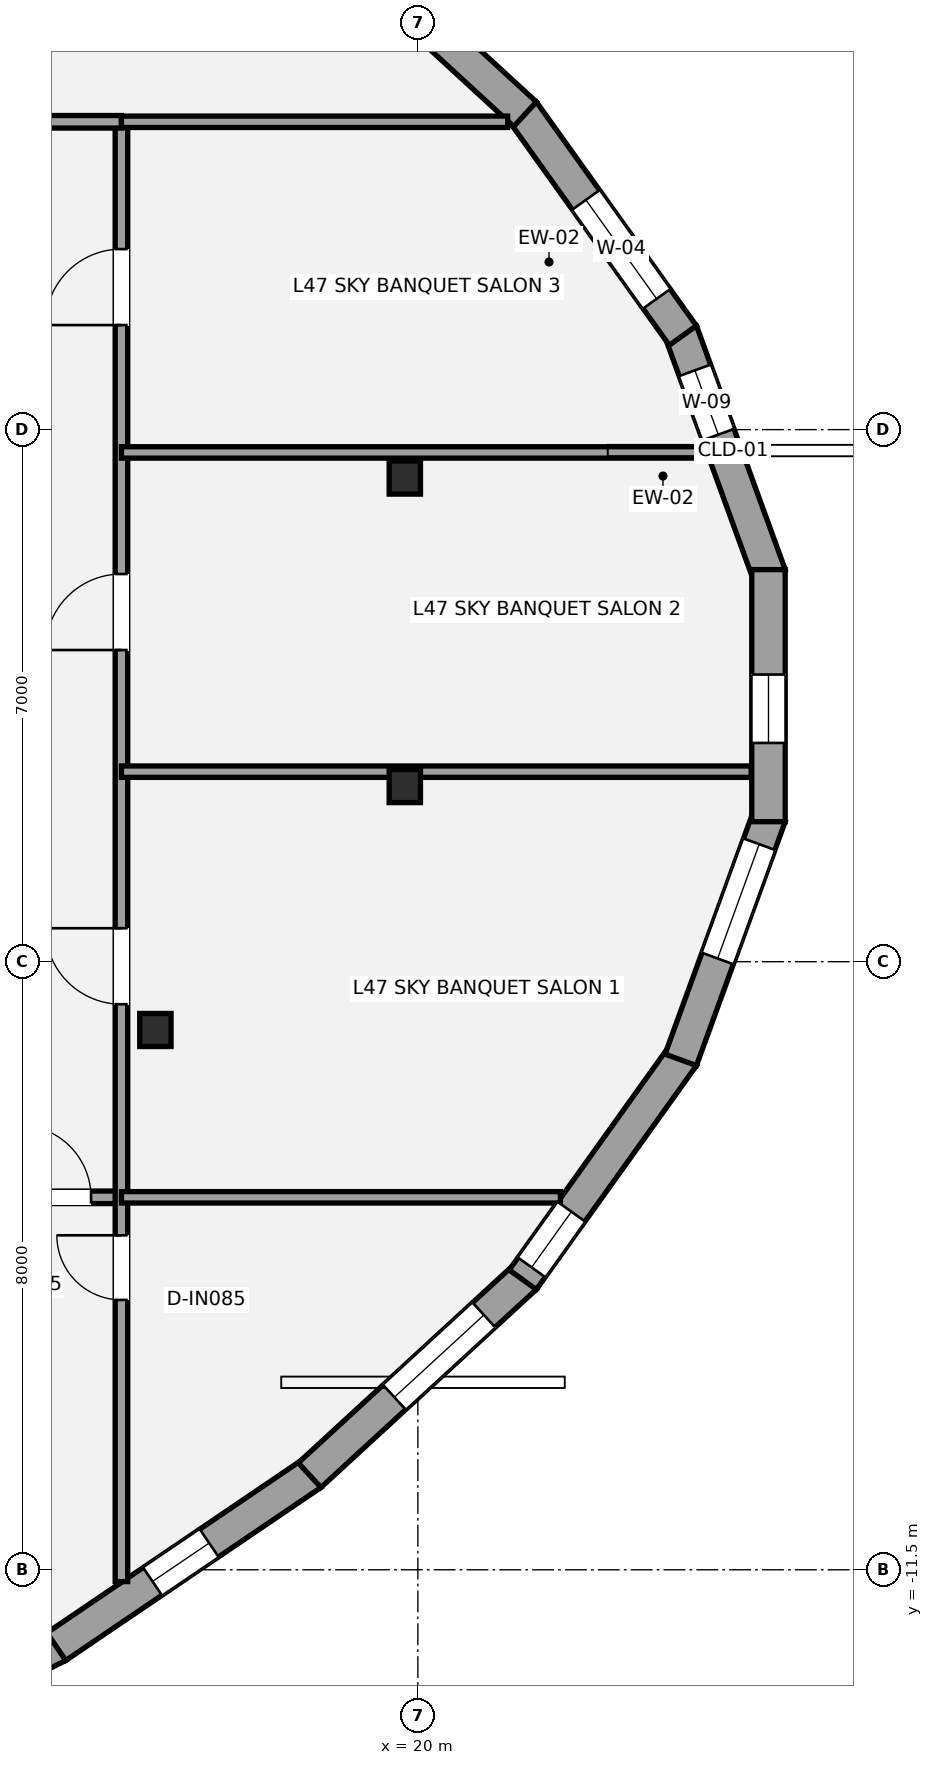
"""IFC4 building model, lengths in metres.
Left out: names, types, materials, properties, quantities, classifications, styles, units other than length and angle.
Written with IfcOpenShell. Run it as: python <this file> out.ifc"""

import sys

from ifc_helpers import new_model, si_unit, direction, frame, frame_2d, origin, origin_2d, place, context, subcontext, project, spatial, rectangle, i_section, extrude, element, fill, save


model = new_model("IFC4")
c1 = context("Model", 3, precision=1e-05, world=origin(), true_north=direction((0.0, 1.0)))
c2 = subcontext(c1, "Body", "Model", "MODEL_VIEW")
j1 = project(units=[si_unit("LENGTHUNIT", "METRE"), si_unit("PLANEANGLEUNIT", "RADIAN")], contexts=[c1])
p1 = place(None, origin())
s1 = spatial("IfcSite", under=j1, at=p1, CompositionType="ELEMENT")
p2 = place(p1, origin())
s2 = spatial("IfcBuilding", under=s1, at=p2, CompositionType="ELEMENT")
p3 = place(p2, frame((0.0, 0.0, 172.6)))
s3 = spatial("IfcBuildingStorey", under=s2, at=p3, CompositionType="ELEMENT", Elevation=172.6)
for number, where, z_axis, x_axis in (
    (1, (19.828, 2.869, 0.0), (0.0, 0.0, 1.0), (1.0, 0.0, 0.0)),
    (2, (16.547, -4.398, 0.0), (0.0, 0.0, 1.0), (1.0, 0.0, 0.0)),
    (3, (19.828, -1.189, 0.0), (0.0, 0.0, 1.0), (1.0, 0.0, 0.0)),
):
    element("IfcColumn", number, at=place(p3, frame(where, z_axis=z_axis, x_axis=x_axis)), inside=s3, PredefinedType="COLUMN", context=c2, shape_type="SweptSolid", body=[
        extrude(i_section(OverallWidth=0.412, OverallDepth=0.435, WebThickness=0.036, FlangeThickness=0.057, at=origin_2d()), origin(), (0.0, 0.0, 1.0), 3.2),
    ])
p4 = place(p3, frame((23.459, 4.791, 0.0), z_axis=(0.0, 0.0, 1.0), x_axis=(0.341938259916, -0.93972241987, 0.0)))
e4 = element("IfcWall", 4, at=p4, inside=s3, PredefinedType="STANDARD", context=c2, shape_type="SweptSolid", body=[
    extrude(rectangle(XDim=3.414, YDim=0.44, at=frame_2d((1.707, 0.0))), origin(), (0.0, 0.0, 1.0), 2.315),
])
p5 = place(p4, frame((0.544, 0.0, 0.58)))
e5 = element("IfcOpeningElement", 5, at=p5, cuts=e4, PredefinedType="OPENING", context=c2, shape_type="SweptSolid", body=[
    extrude(rectangle(XDim=0.9, YDim=1.35, at=frame_2d((0.45, 0.675))), frame((0.0, 0.23, 0.0), z_axis=(0.0, -1.0, 0.0), x_axis=(1.0, 0.0, 0.0)), (0.0, 0.0, 1.0), 0.46),
])
p6 = place(p3, frame((21.38, 7.684, 0.0), z_axis=(0.0, 0.0, 1.0), x_axis=(0.581678195571, -0.813419004448, 0.0)))
e6 = element("IfcWall", 6, at=p6, inside=s3, PredefinedType="STANDARD", context=c2, shape_type="SweptSolid", body=[
    extrude(rectangle(XDim=3.621, YDim=0.44, at=frame_2d((1.811, 0.0))), origin(), (0.0, 0.0, 1.0), 2.315),
])
p7 = place(p6, frame((1.428, 0.0, 0.58)))
e7 = element("IfcOpeningElement", 7, at=p7, cuts=e6, PredefinedType="OPENING", context=c2, shape_type="SweptSolid", body=[
    extrude(rectangle(XDim=1.6, YDim=1.55, at=frame_2d((0.8, 0.775))), frame((0.0, 0.23, 0.0), z_axis=(0.0, -1.0, 0.0), x_axis=(1.0, 0.0, 0.0)), (0.0, 0.0, 1.0), 0.46),
])
p8 = place(p3, frame((18.576, 10.255, 0.0), z_axis=(0.0, 0.0, 1.0), x_axis=(0.736282263947, -0.676674536093, 0.0)))
e8 = element("IfcWall", 8, at=p8, inside=s3, PredefinedType="STANDARD", context=c2, shape_type="SweptSolid", body=[
    extrude(rectangle(XDim=3.85, YDim=0.44, at=frame_2d((1.925, 0.0))), origin(), (0.0, 0.0, 1.0), 2.315),
])
p9 = place(p8, frame((0.687, 0.0, 0.58)))
e9 = element("IfcOpeningElement", 9, at=p9, cuts=e8, PredefinedType="OPENING", context=c2, shape_type="SweptSolid", body=[
    extrude(rectangle(XDim=1.6, YDim=1.55, at=frame_2d((0.8, 0.775))), frame((0.0, 0.23, 0.0), z_axis=(0.0, -1.0, 0.0), x_axis=(1.0, 0.0, 0.0)), (0.0, 0.0, 1.0), 0.46),
])
p10 = place(p3, frame((15.269, -12.497, 0.0), z_axis=(0.0, 0.0, 1.0), x_axis=(-0.894427191, -0.4472135955, 0.0)))
e10 = element("IfcWall", 10, at=p10, inside=s3, PredefinedType="STANDARD", context=c2, shape_type="SweptSolid", body=[
    extrude(rectangle(XDim=4.297, YDim=0.44, at=frame_2d((2.148, 0.0))), origin(), (0.0, 0.0, 1.0), 2.315),
])
p11 = place(p10, frame((1.049, 0.0, 0.58)))
e11 = element("IfcOpeningElement", 11, at=p11, cuts=e10, PredefinedType="OPENING", context=c2, shape_type="SweptSolid", body=[
    extrude(rectangle(XDim=1.6, YDim=1.55, at=frame_2d((0.8, 0.775))), frame((0.0, 0.23, 0.0), z_axis=(0.0, -1.0, 0.0), x_axis=(1.0, 0.0, 0.0)), (0.0, 0.0, 1.0), 0.46),
])
p12 = place(p3, frame((18.601, -10.235, 0.0), z_axis=(0.0, 0.0, 1.0), x_axis=(-0.827757295322, -0.561086321382, 0.0)))
e12 = element("IfcWall", 12, at=p12, inside=s3, PredefinedType="STANDARD", context=c2, shape_type="SweptSolid", body=[
    extrude(rectangle(XDim=4.057, YDim=0.44, at=frame_2d((2.028, 0.0))), origin(), (0.0, 0.0, 1.0), 2.315),
])
p13 = place(p12, frame((1.627, 0.0, 0.58)))
e13 = element("IfcOpeningElement", 13, at=p13, cuts=e12, PredefinedType="OPENING", context=c2, shape_type="SweptSolid", body=[
    extrude(rectangle(XDim=0.9, YDim=1.35, at=frame_2d((0.45, 0.675))), frame((0.0, 0.23, 0.0), z_axis=(0.0, -1.0, 0.0), x_axis=(1.0, 0.0, 0.0)), (0.0, 0.0, 1.0), 0.46),
])
p14 = place(p3, frame((21.41, -7.65, 0.0), z_axis=(0.0, 0.0, 1.0), x_axis=(-0.736282263947, -0.676674536093, 0.0)))
e14 = element("IfcWall", 14, at=p14, inside=s3, PredefinedType="STANDARD", context=c2, shape_type="SweptSolid", body=[
    extrude(rectangle(XDim=3.85, YDim=0.44, at=frame_2d((1.925, 0.0))), origin(), (0.0, 0.0, 1.0), 2.315),
])
p15 = place(p14, frame((0.736, 0.0, 0.58)))
e15 = element("IfcOpeningElement", 15, at=p15, cuts=e14, PredefinedType="OPENING", context=c2, shape_type="SweptSolid", body=[
    extrude(rectangle(XDim=1.6, YDim=1.55, at=frame_2d((0.8, 0.775))), frame((0.0, 0.23, 0.0), z_axis=(0.0, -1.0, 0.0), x_axis=(1.0, 0.0, 0.0)), (0.0, 0.0, 1.0), 0.46),
])
p16 = place(p3, frame((23.487, -4.739, 0.0), z_axis=(0.0, 0.0, 1.0), x_axis=(-0.581678195571, -0.813419004448, 0.0)))
e16 = element("IfcWall", 16, at=p16, inside=s3, PredefinedType="STANDARD", context=c2, shape_type="SweptSolid", body=[
    extrude(rectangle(XDim=3.621, YDim=0.44, at=frame_2d((1.811, 0.0))), origin(), (0.0, 0.0, 1.0), 2.315),
])
p17 = place(p16, frame((2.521, 0.0, 0.58)))
e17 = element("IfcOpeningElement", 17, at=p17, cuts=e16, PredefinedType="OPENING", context=c2, shape_type="SweptSolid", body=[
    extrude(rectangle(XDim=0.9, YDim=1.35, at=frame_2d((0.45, 0.675))), frame((0.0, 0.23, 0.0), z_axis=(0.0, -1.0, 0.0), x_axis=(1.0, 0.0, 0.0)), (0.0, 0.0, 1.0), 0.46),
])
p18 = place(p3, frame((24.626, -1.583, 0.0), z_axis=(0.0, 0.0, 1.0), x_axis=(-0.341938259916, -0.93972241987, 0.0)))
e18 = element("IfcWall", 18, at=p18, inside=s3, PredefinedType="STANDARD", context=c2, shape_type="SweptSolid", body=[
    extrude(rectangle(XDim=3.414, YDim=0.44, at=frame_2d((1.707, 0.0))), origin(), (0.0, 0.0, 1.0), 2.315),
])
p19 = place(p18, frame((0.395, 0.0, 0.58)))
e19 = element("IfcOpeningElement", 19, at=p19, cuts=e18, PredefinedType="OPENING", context=c2, shape_type="SweptSolid", body=[
    extrude(rectangle(XDim=1.6, YDim=1.55, at=frame_2d((0.8, 0.775))), frame((0.0, 0.23, 0.0), z_axis=(0.0, -1.0, 0.0), x_axis=(1.0, 0.0, 0.0)), (0.0, 0.0, 1.0), 0.46),
])
p20 = place(p3, frame((24.613, 1.658, 0.0), z_axis=(0.0, 0.0, 1.0), x_axis=(0.0, -1.0, 0.0)))
e20 = element("IfcWall", 20, at=p20, inside=s3, PredefinedType="STANDARD", context=c2, shape_type="SweptSolid", body=[
    extrude(rectangle(XDim=3.316, YDim=0.44, at=frame_2d((1.658, 0.0))), origin(), (0.0, 0.0, 1.0), 2.315),
])
p21 = place(p20, frame((1.38, 0.0, 0.58)))
e21 = element("IfcOpeningElement", 21, at=p21, cuts=e20, PredefinedType="OPENING", context=c2, shape_type="SweptSolid", body=[
    extrude(rectangle(XDim=0.9, YDim=1.35, at=frame_2d((0.45, 0.675))), frame((0.0, 0.23, 0.0), z_axis=(0.0, -1.0, 0.0), x_axis=(1.0, 0.0, 0.0)), (0.0, 0.0, 1.0), 0.46),
])
p22 = place(p3, frame((-15.55, -6.6, 0.0), z_axis=(0.0, 0.0, 1.0), x_axis=(1.0, 0.0, 0.0)))
e22 = element("IfcWall", 22, at=p22, inside=s3, PredefinedType="PARTITIONING", context=c2, shape_type="SweptSolid", body=[
    extrude(rectangle(XDim=31.65, YDim=0.165, at=frame_2d((15.825, 0.0))), origin(), (0.0, 0.0, 1.0), 2.398),
])
p23 = place(p22, frame((14.7, 0.0, 0.0)))
e23 = element("IfcOpeningElement", 23, at=p23, cuts=e22, PredefinedType="OPENING", context=c2, shape_type="SweptSolid", body=[
    extrude(rectangle(XDim=0.95, YDim=2.15, at=frame_2d((0.475, 1.075))), frame((0.0, 0.093, 0.0), z_axis=(0.0, -1.0, 0.0), x_axis=(1.0, 0.0, 0.0)), (0.0, 0.0, 1.0), 0.185),
])
p24 = place(p22, frame((30.3, 0.0, 0.0)))
e24 = element("IfcOpeningElement", 24, at=p24, cuts=e22, PredefinedType="OPENING", context=c2, shape_type="SweptSolid", body=[
    extrude(rectangle(XDim=0.95, YDim=2.15, at=frame_2d((0.475, 1.075))), frame((0.0, 0.093, 0.0), z_axis=(0.0, -1.0, 0.0), x_axis=(1.0, 0.0, 0.0)), (0.0, 0.0, 1.0), 0.185),
])
p25 = place(p3, frame((16.1, -11.655, 0.0), z_axis=(0.0, 0.0, 1.0), x_axis=(0.0, 1.0, 0.0)))
e25 = element("IfcWall", 25, at=p25, inside=s3, PredefinedType="PARTITIONING", context=c2, shape_type="SweptSolid", body=[
    extrude(rectangle(XDim=19.205, YDim=0.165, at=frame_2d((9.603, 0.0))), origin(), (0.0, 0.0, 1.0), 2.473),
])
p26 = place(p25, frame((3.706, 0.0, 0.0)))
e26 = element("IfcOpeningElement", 26, at=p26, cuts=e25, PredefinedType="OPENING", context=c2, shape_type="SweptSolid", body=[
    extrude(rectangle(XDim=0.85, YDim=2.1, at=frame_2d((0.425, 1.05))), frame((0.0, 0.093, 0.0), z_axis=(0.0, -1.0, 0.0), x_axis=(1.0, 0.0, 0.0)), (0.0, 0.0, 1.0), 0.185),
])
p27 = place(p25, frame((7.596, 0.0, 0.0)))
e27 = element("IfcOpeningElement", 27, at=p27, cuts=e25, PredefinedType="OPENING", context=c2, shape_type="SweptSolid", body=[
    extrude(rectangle(XDim=1.0, YDim=2.15, at=frame_2d((0.5, 1.075))), frame((0.0, 0.093, 0.0), z_axis=(0.0, -1.0, 0.0), x_axis=(1.0, 0.0, 0.0)), (0.0, 0.0, 1.0), 0.185),
])
p28 = place(p25, frame((12.256, 0.0, 0.0)))
e28 = element("IfcOpeningElement", 28, at=p28, cuts=e25, PredefinedType="OPENING", context=c2, shape_type="SweptSolid", body=[
    extrude(rectangle(XDim=1.0, YDim=2.15, at=frame_2d((0.5, 1.075))), frame((0.0, 0.093, 0.0), z_axis=(0.0, -1.0, 0.0), x_axis=(1.0, 0.0, 0.0)), (0.0, 0.0, 1.0), 0.185),
])
p29 = place(p25, frame((16.531, 0.0, 0.0)))
e29 = element("IfcOpeningElement", 29, at=p29, cuts=e25, PredefinedType="OPENING", context=c2, shape_type="SweptSolid", body=[
    extrude(rectangle(XDim=1.0, YDim=2.15, at=frame_2d((0.5, 1.075))), frame((0.0, 0.093, 0.0), z_axis=(0.0, -1.0, 0.0), x_axis=(1.0, 0.0, 0.0)), (0.0, 0.0, 1.0), 0.185),
])
p30 = place(p3, frame((13.8, 7.55, 0.0), z_axis=(0.0, 0.0, 1.0), x_axis=(1.0, 0.0, 0.0)))
e30 = element("IfcWall", 30, at=p30, inside=s3, PredefinedType="PARTITIONING", context=c2, shape_type="SweptSolid", body=[
    extrude(rectangle(XDim=2.3, YDim=0.165, at=frame_2d((1.15, 0.0))), origin(), (0.0, 0.0, 1.0), 3.02),
])
p31 = place(p30, frame((0.3, 0.0, 0.0)))
e31 = element("IfcOpeningElement", 31, at=p31, cuts=e30, PredefinedType="OPENING", context=c2, shape_type="SweptSolid", body=[
    extrude(rectangle(XDim=1.0, YDim=2.15, at=frame_2d((0.5, 1.075))), frame((0.0, 0.093, 0.0), z_axis=(0.0, -1.0, 0.0), x_axis=(1.0, 0.0, 0.0)), (0.0, 0.0, 1.0), 0.185),
])
p32 = place(p3, frame((16.1, 7.55, 0.0), z_axis=(0.0, 0.0, 1.0), x_axis=(1.0, 0.0, 0.0)))
e32 = element("IfcWall", 32, at=p32, inside=s3, PredefinedType="PLUMBINGWALL", context=c2, shape_type="SweptSolid", body=[
    extrude(rectangle(XDim=5.082, YDim=0.15, at=frame_2d((2.541, 0.0))), origin(), (0.0, 0.0, 1.0), 2.473),
])
p33 = place(p3, frame((16.1, -6.6, 0.0), z_axis=(0.0, 0.0, 1.0), x_axis=(1.0, 0.0, 0.0)))
e33 = element("IfcWall", 33, at=p33, inside=s3, PredefinedType="PLUMBINGWALL", context=c2, shape_type="SweptSolid", body=[
    extrude(rectangle(XDim=5.775, YDim=0.15, at=frame_2d((2.888, 0.0))), origin(), (0.0, 0.0, 1.0), 2.473),
])
p34 = place(p3, frame((16.1, -1.0, 0.0), z_axis=(0.0, 0.0, 1.0), x_axis=(1.0, 0.0, 0.0)))
e34 = element("IfcWall", 34, at=p34, inside=s3, PredefinedType="PLUMBINGWALL", context=c2, shape_type="SweptSolid", body=[
    extrude(rectangle(XDim=8.285, YDim=0.15, at=frame_2d((4.143, 0.0))), origin(), (0.0, 0.0, 1.0), 2.473),
])
p35 = place(p3, frame((16.1, 3.2, 0.0), z_axis=(0.0, 0.0, 1.0), x_axis=(1.0, 0.0, 0.0)))
e35 = element("IfcWall", 35, at=p35, inside=s3, PredefinedType="PLUMBINGWALL", context=c2, shape_type="SweptSolid", body=[
    extrude(rectangle(XDim=7.695, YDim=0.15, at=frame_2d((3.848, 0.0))), origin(), (0.0, 0.0, 1.0), 2.473),
])
p36 = place(p5, origin())
e36 = element("IfcWindow", 36, at=p36, inside=s3, PartitioningType="SINGLE_PANEL", PredefinedType="WINDOW", context=c2, shape_type="SweptSolid", body=[
    extrude(rectangle(XDim=0.9, YDim=1.35, at=frame_2d((0.45, 0.675))), frame((0.0, -0.01, 0.0), z_axis=(0.0, -1.0, 0.0), x_axis=(1.0, 0.0, 0.0)), (0.0, 0.0, 1.0), 0.06),
])
fill(e5, e36)
p37 = place(p7, origin())
e37 = element("IfcWindow", 37, at=p37, inside=s3, PartitioningType="SINGLE_PANEL", PredefinedType="WINDOW", context=c2, shape_type="SweptSolid", body=[
    extrude(rectangle(XDim=1.6, YDim=1.55, at=frame_2d((0.8, 0.775))), frame((0.0, -0.01, 0.0), z_axis=(0.0, -1.0, 0.0), x_axis=(1.0, 0.0, 0.0)), (0.0, 0.0, 1.0), 0.06),
])
fill(e7, e37)
p38 = place(p13, origin())
e38 = element("IfcWindow", 38, at=p38, inside=s3, PartitioningType="SINGLE_PANEL", PredefinedType="WINDOW", context=c2, shape_type="SweptSolid", body=[
    extrude(rectangle(XDim=0.9, YDim=1.35, at=frame_2d((0.45, 0.675))), frame((0.0, -0.01, 0.0), z_axis=(0.0, -1.0, 0.0), x_axis=(1.0, 0.0, 0.0)), (0.0, 0.0, 1.0), 0.06),
])
fill(e13, e38)
p39 = place(p15, origin())
e39 = element("IfcWindow", 39, at=p39, inside=s3, PartitioningType="SINGLE_PANEL", PredefinedType="WINDOW", context=c2, shape_type="SweptSolid", body=[
    extrude(rectangle(XDim=1.6, YDim=1.55, at=frame_2d((0.8, 0.775))), frame((0.0, -0.01, 0.0), z_axis=(0.0, -1.0, 0.0), x_axis=(1.0, 0.0, 0.0)), (0.0, 0.0, 1.0), 0.06),
])
fill(e15, e39)
p40 = place(p17, origin())
e40 = element("IfcWindow", 40, at=p40, inside=s3, PartitioningType="SINGLE_PANEL", PredefinedType="WINDOW", context=c2, shape_type="SweptSolid", body=[
    extrude(rectangle(XDim=0.9, YDim=1.35, at=frame_2d((0.45, 0.675))), frame((0.0, -0.01, 0.0), z_axis=(0.0, -1.0, 0.0), x_axis=(1.0, 0.0, 0.0)), (0.0, 0.0, 1.0), 0.06),
])
fill(e17, e40)
p41 = place(p19, origin())
e41 = element("IfcWindow", 41, at=p41, inside=s3, PartitioningType="SINGLE_PANEL", PredefinedType="WINDOW", context=c2, shape_type="SweptSolid", body=[
    extrude(rectangle(XDim=1.6, YDim=1.55, at=frame_2d((0.8, 0.775))), frame((0.0, -0.01, 0.0), z_axis=(0.0, -1.0, 0.0), x_axis=(1.0, 0.0, 0.0)), (0.0, 0.0, 1.0), 0.06),
])
fill(e19, e41)
p42 = place(p21, origin())
e42 = element("IfcWindow", 42, at=p42, inside=s3, PartitioningType="SINGLE_PANEL", PredefinedType="WINDOW", context=c2, shape_type="SweptSolid", body=[
    extrude(rectangle(XDim=0.9, YDim=1.35, at=frame_2d((0.45, 0.675))), frame((0.0, -0.01, 0.0), z_axis=(0.0, -1.0, 0.0), x_axis=(1.0, 0.0, 0.0)), (0.0, 0.0, 1.0), 0.06),
])
fill(e21, e42)
p43 = place(p26, origin())
e43 = element("IfcDoor", 43, at=p43, inside=s3, OperationType="SINGLE_SWING_RIGHT", PredefinedType="DOOR", context=c2, shape_type="SweptSolid", body=[
    extrude(rectangle(XDim=0.85, YDim=2.1, at=frame_2d((0.425, 1.05))), frame((0.0, 0.025, 0.0), z_axis=(0.0, -1.0, 0.0), x_axis=(1.0, 0.0, 0.0)), (0.0, 0.0, 1.0), 0.05),
])
fill(e26, e43)
p44 = place(p24, origin())
e44 = element("IfcDoor", 44, at=p44, inside=s3, OperationType="SINGLE_SWING_LEFT", PredefinedType="DOOR", context=c2, shape_type="SweptSolid", body=[
    extrude(rectangle(XDim=0.95, YDim=2.15, at=frame_2d((0.475, 1.075))), frame((0.0, 0.025, 0.0), z_axis=(0.0, -1.0, 0.0), x_axis=(1.0, 0.0, 0.0)), (0.0, 0.0, 1.0), 0.05),
])
fill(e24, e44)
p45 = place(p27, origin())
e45 = element("IfcDoor", 45, at=p45, inside=s3, OperationType="SINGLE_SWING_RIGHT", PredefinedType="DOOR", context=c2, shape_type="SweptSolid", body=[
    extrude(rectangle(XDim=1.0, YDim=2.15, at=frame_2d((0.5, 1.075))), frame((0.0, 0.025, 0.0), z_axis=(0.0, -1.0, 0.0), x_axis=(1.0, 0.0, 0.0)), (0.0, 0.0, 1.0), 0.05),
])
fill(e27, e45)
p46 = place(p28, origin())
e46 = element("IfcDoor", 46, at=p46, inside=s3, OperationType="SINGLE_SWING_LEFT", PredefinedType="DOOR", context=c2, shape_type="SweptSolid", body=[
    extrude(rectangle(XDim=1.0, YDim=2.15, at=frame_2d((0.5, 1.075))), frame((0.0, 0.025, 0.0), z_axis=(0.0, -1.0, 0.0), x_axis=(1.0, 0.0, 0.0)), (0.0, 0.0, 1.0), 0.05),
])
fill(e28, e46)
p47 = place(p29, origin())
e47 = element("IfcDoor", 47, at=p47, inside=s3, OperationType="SINGLE_SWING_LEFT", PredefinedType="DOOR", context=c2, shape_type="SweptSolid", body=[
    extrude(rectangle(XDim=1.0, YDim=2.15, at=frame_2d((0.5, 1.075))), frame((0.0, 0.025, 0.0), z_axis=(0.0, -1.0, 0.0), x_axis=(1.0, 0.0, 0.0)), (0.0, 0.0, 1.0), 0.05),
])
fill(e29, e47)
save(model, sys.argv[1])
